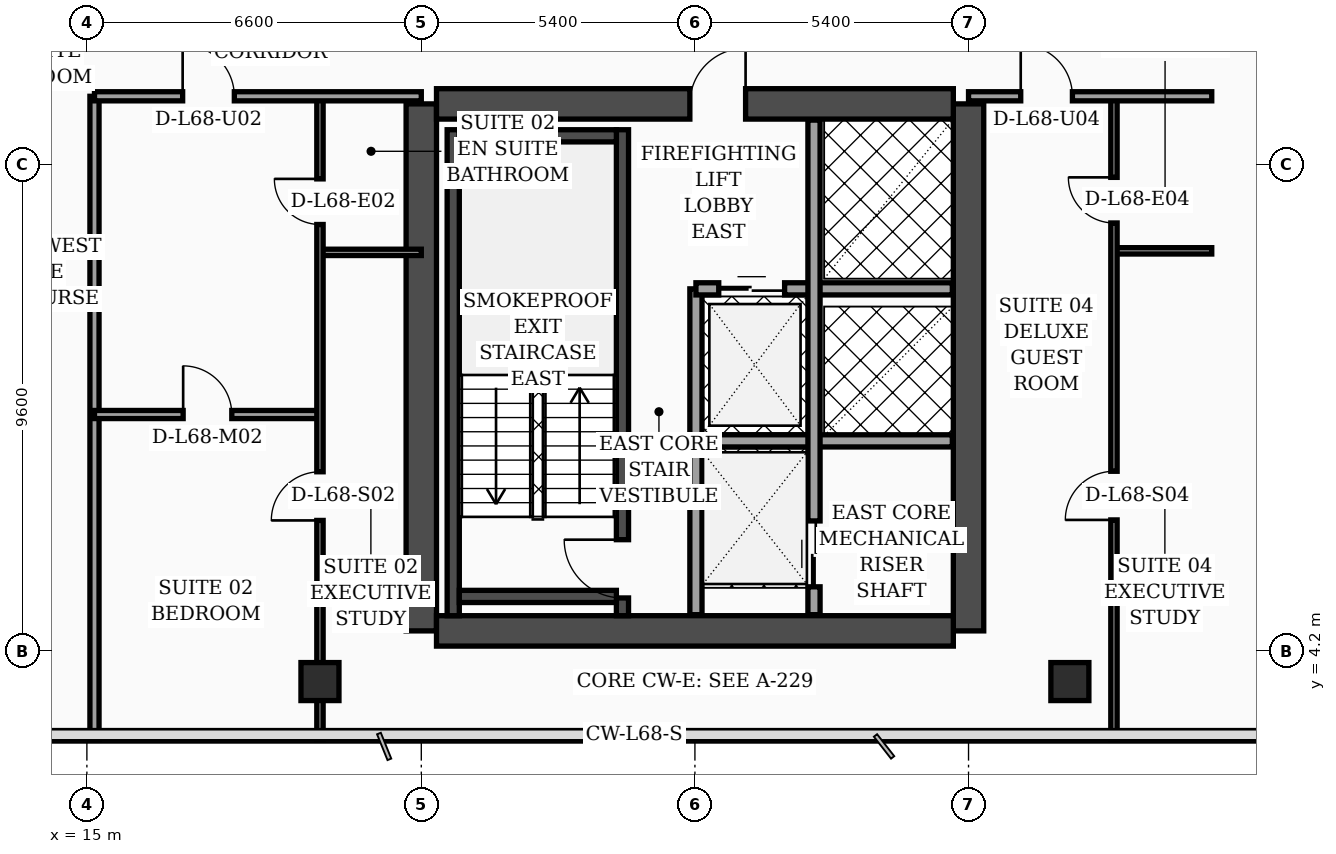
"""IFC4 building model, lengths in metres.
Left out: names, types, materials, properties, quantities, classifications, styles, units other than length and angle.
Written with IfcOpenShell. Run it as: python <this file> out.ifc"""

import sys

from ifc_helpers import new_model, si_unit, direction, frame, frame_2d, origin, origin_2d, place, context, subcontext, project, spatial, rectangle, hollow_rectangle, extrude, element, fill, save


model = new_model("IFC4")
c1 = context("Model", 3, precision=1e-05, world=origin(), true_north=direction((0.0, 1.0)))
c2 = subcontext(c1, "Body", "Model", "MODEL_VIEW")
j1 = project(units=[si_unit("LENGTHUNIT", "METRE"), si_unit("PLANEANGLEUNIT", "RADIAN")], contexts=[c1])
p1 = place(None, origin())
s1 = spatial("IfcSite", under=j1, at=p1, CompositionType="ELEMENT")
p2 = place(p1, origin())
s2 = spatial("IfcBuilding", under=s1, at=p2, CompositionType="ELEMENT")
p3 = place(p2, frame((0.0, 0.0, 274.9)))
s3 = spatial("IfcBuildingStorey", under=s2, at=p3, CompositionType="ELEMENT", Elevation=274.9)
for number, where, z_axis, x_axis in (
    (1, (21.6, 4.6, 0.0), (0.0, 0.0, 1.0), (0.0, 1.0, 0.0)),
    (2, (32.4, 4.6, 0.0), (0.0, 0.0, 1.0), (0.0, 1.0, 0.0)),
):
    element("IfcWall", number, at=place(p3, frame(where, z_axis=z_axis, x_axis=x_axis)), inside=s3, PredefinedType="SHEAR", context=c2, shape_type="SweptSolid", body=[
        extrude(rectangle(XDim=10.4, YDim=0.6, at=frame_2d((5.2, 0.0))), origin(), (0.0, 0.0, 1.0), 3.56),
    ])
p4 = place(p3, frame((21.9, 15.0, 0.0), z_axis=(0.0, 0.0, 1.0), x_axis=(1.0, 0.0, 0.0)))
e3 = element("IfcWall", 3, at=p4, inside=s3, PredefinedType="SHEAR", context=c2, shape_type="SweptSolid", body=[
    extrude(rectangle(XDim=10.2, YDim=0.6, at=frame_2d((5.1, 0.0))), origin(), (0.0, 0.0, 1.0), 3.56),
])
p5 = place(p4, frame((5.0, 0.0, 0.0)))
e4 = element("IfcOpeningElement", 4, at=p5, cuts=e3, PredefinedType="OPENING", context=c2, shape_type="SweptSolid", body=[
    extrude(rectangle(XDim=1.1, YDim=2.2, at=frame_2d((0.55, 1.1))), frame((0.0, 0.31, 0.0), z_axis=(0.0, -1.0, 0.0), x_axis=(1.0, 0.0, 0.0)), (0.0, 0.0, 1.0), 0.62),
])
p6 = place(p3, frame((21.9, 4.6, 0.0), z_axis=(0.0, 0.0, 1.0), x_axis=(1.0, 0.0, 0.0)))
e5 = element("IfcWall", 5, at=p6, inside=s3, PredefinedType="SHEAR", context=c2, shape_type="SweptSolid", body=[
    extrude(rectangle(XDim=10.2, YDim=0.6, at=frame_2d((5.1, 0.0))), origin(), (0.0, 0.0, 1.0), 3.56),
])
p7 = place(p3, frame((22.23, 4.9, 0.0), z_axis=(0.0, 0.0, 1.0), x_axis=(0.0, 1.0, 0.0)))
e6 = element("IfcWall", 6, at=p7, inside=s3, PredefinedType="SOLIDWALL", context=c2, shape_type="SweptSolid", body=[
    extrude(rectangle(XDim=9.59, YDim=0.24, at=frame_2d((4.795, 0.0))), origin(), (0.0, 0.0, 1.0), 3.56),
])
p8 = place(p3, frame((25.57, 4.9, 0.0), z_axis=(0.0, 0.0, 1.0), x_axis=(0.0, 1.0, 0.0)))
e7 = element("IfcWall", 7, at=p8, inside=s3, PredefinedType="SOLIDWALL", context=c2, shape_type="SweptSolid", body=[
    extrude(rectangle(XDim=9.59, YDim=0.24, at=frame_2d((4.795, 0.0))), origin(), (0.0, 0.0, 1.0), 3.56),
])
p9 = place(p8, frame((0.35, 0.0, 0.0)))
e8 = element("IfcOpeningElement", 8, at=p9, cuts=e7, PredefinedType="OPENING", context=c2, shape_type="SweptSolid", body=[
    extrude(rectangle(XDim=1.15, YDim=2.2, at=frame_2d((0.575, 1.1))), frame((0.0, 0.13, 0.0), z_axis=(0.0, -1.0, 0.0), x_axis=(1.0, 0.0, 0.0)), (0.0, 0.0, 1.0), 0.26),
])
for number, where, z_axis, x_axis in (
    (9, (22.35, 5.28, 0.0), (0.0, 0.0, 1.0), (1.0, 0.0, 0.0)),
    (10, (22.35, 14.37, 0.0), (0.0, 0.0, 1.0), (1.0, 0.0, 0.0)),
):
    element("IfcWall", number, at=place(p3, frame(where, z_axis=z_axis, x_axis=x_axis)), inside=s3, PredefinedType="SOLIDWALL", context=c2, shape_type="SweptSolid", body=[
        extrude(rectangle(XDim=3.1, YDim=0.24, at=frame_2d((1.55, 0.0))), origin(), (0.0, 0.0, 1.0), 3.56),
    ])
for number, where, z_axis, x_axis in (
    (11, (19.6, 3.6, 0.0), (0.0, 0.0, 1.0), (1.0, 0.0, 0.0)),
    (12, (34.4, 3.6, 0.0), (0.0, 0.0, 1.0), (1.0, 0.0, 0.0)),
):
    element("IfcColumn", number, at=place(p3, frame(where, z_axis=z_axis, x_axis=x_axis)), inside=s3, PredefinedType="COLUMN", context=c2, shape_type="SweptSolid", body=[
        extrude(hollow_rectangle(XDim=0.75, YDim=0.75, WallThickness=0.032, at=origin_2d()), origin(), (0.0, 0.0, 1.0), 3.56),
    ])
p10 = place(p3, frame((43.83, 5.505, 0.0), z_axis=(0.0, 0.0, 1.0), x_axis=(-0.300509063924, 0.953778958931, 0.0)))
e13 = element("IfcWall", 13, at=p10, inside=s3, PredefinedType="SOLIDWALL", context=c2, shape_type="SweptSolid", body=[
    extrude(rectangle(XDim=30.814, YDim=0.32, at=frame_2d((15.407, 0.0))), origin(), (0.0, 0.0, 1.0), 3.56),
])
p11 = place(p10, frame((10.199, 0.0, 0.0)))
e14 = element("IfcOpeningElement", 14, at=p11, cuts=e13, PredefinedType="OPENING", context=c2, shape_type="SweptSolid", body=[
    extrude(rectangle(XDim=1.4, YDim=2.25, at=frame_2d((0.7, 1.125))), frame((0.0, 0.17, 0.0), z_axis=(0.0, -1.0, 0.0), x_axis=(1.0, 0.0, 0.0)), (0.0, 0.0, 1.0), 0.34),
])
p12 = place(p10, frame((4.437, 0.0, 0.7)))
e15 = element("IfcOpeningElement", 15, at=p12, cuts=e13, PredefinedType="OPENING", context=c2, shape_type="SweptSolid", body=[
    extrude(rectangle(XDim=1.6, YDim=1.65, at=frame_2d((0.8, 0.825))), frame((0.0, 0.17, 0.0), z_axis=(0.0, -1.0, 0.0), x_axis=(1.0, 0.0, 0.0)), (0.0, 0.0, 1.0), 0.34),
])
p13 = place(p10, frame((18.696, 0.0, 0.7)))
e16 = element("IfcOpeningElement", 16, at=p13, cuts=e13, PredefinedType="OPENING", context=c2, shape_type="SweptSolid", body=[
    extrude(rectangle(XDim=1.6, YDim=1.65, at=frame_2d((0.8, 0.825))), frame((0.0, 0.17, 0.0), z_axis=(0.0, -1.0, 0.0), x_axis=(1.0, 0.0, 0.0)), (0.0, 0.0, 1.0), 0.34),
])
p14 = place(p10, frame((1.6, 0.0, 0.75)))
e17 = element("IfcOpeningElement", 17, at=p14, cuts=e13, PredefinedType="OPENING", context=c2, shape_type="SweptSolid", body=[
    extrude(rectangle(XDim=1.5, YDim=1.6, at=frame_2d((0.75, 0.8))), frame((0.0, 0.17, 0.0), z_axis=(0.0, -1.0, 0.0), x_axis=(1.0, 0.0, 0.0)), (0.0, 0.0, 1.0), 0.34),
])
p15 = place(p10, frame((7.8, 0.0, 0.75)))
e18 = element("IfcOpeningElement", 18, at=p15, cuts=e13, PredefinedType="OPENING", context=c2, shape_type="SweptSolid", body=[
    extrude(rectangle(XDim=1.5, YDim=1.6, at=frame_2d((0.75, 0.8))), frame((0.0, 0.17, 0.0), z_axis=(0.0, -1.0, 0.0), x_axis=(1.0, 0.0, 0.0)), (0.0, 0.0, 1.0), 0.34),
])
p16 = place(p10, frame((14.0, 0.0, 0.75)))
e19 = element("IfcOpeningElement", 19, at=p16, cuts=e13, PredefinedType="OPENING", context=c2, shape_type="SweptSolid", body=[
    extrude(rectangle(XDim=1.5, YDim=1.6, at=frame_2d((0.75, 0.8))), frame((0.0, 0.17, 0.0), z_axis=(0.0, -1.0, 0.0), x_axis=(1.0, 0.0, 0.0)), (0.0, 0.0, 1.0), 0.34),
])
p17 = place(p10, frame((16.55, 0.0, 0.75)))
e20 = element("IfcOpeningElement", 20, at=p17, cuts=e13, PredefinedType="OPENING", context=c2, shape_type="SweptSolid", body=[
    extrude(rectangle(XDim=1.5, YDim=1.6, at=frame_2d((0.75, 0.8))), frame((0.0, 0.17, 0.0), z_axis=(0.0, -1.0, 0.0), x_axis=(1.0, 0.0, 0.0)), (0.0, 0.0, 1.0), 0.34),
])
p18 = place(p10, frame((20.75, 0.0, 0.75)))
e21 = element("IfcOpeningElement", 21, at=p18, cuts=e13, PredefinedType="OPENING", context=c2, shape_type="SweptSolid", body=[
    extrude(rectangle(XDim=1.5, YDim=1.6, at=frame_2d((0.75, 0.8))), frame((0.0, 0.17, 0.0), z_axis=(0.0, -1.0, 0.0), x_axis=(1.0, 0.0, 0.0)), (0.0, 0.0, 1.0), 0.34),
])
p19 = place(p10, frame((23.3, 0.0, 0.75)))
e22 = element("IfcOpeningElement", 22, at=p19, cuts=e13, PredefinedType="OPENING", context=c2, shape_type="SweptSolid", body=[
    extrude(rectangle(XDim=1.5, YDim=1.6, at=frame_2d((0.75, 0.8))), frame((0.0, 0.17, 0.0), z_axis=(0.0, -1.0, 0.0), x_axis=(1.0, 0.0, 0.0)), (0.0, 0.0, 1.0), 0.34),
])
p20 = place(p10, frame((26.4, 0.0, 0.75)))
e23 = element("IfcOpeningElement", 23, at=p20, cuts=e13, PredefinedType="OPENING", context=c2, shape_type="SweptSolid", body=[
    extrude(rectangle(XDim=1.5, YDim=1.6, at=frame_2d((0.75, 0.8))), frame((0.0, 0.17, 0.0), z_axis=(0.0, -1.0, 0.0), x_axis=(1.0, 0.0, 0.0)), (0.0, 0.0, 1.0), 0.34),
])
p21 = place(p3, frame((27.02, 4.92, 0.0), z_axis=(0.0, 0.0, 1.0), x_axis=(0.0, 1.0, 0.0)))
e24 = element("IfcWall", 24, at=p21, inside=s3, PredefinedType="SOLIDWALL", context=c2, shape_type="SweptSolid", body=[
    extrude(rectangle(XDim=6.43, YDim=0.24, at=frame_2d((3.215, 0.0))), origin(), (0.0, 0.0, 1.0), 3.56),
])
p22 = place(p3, frame((27.02, 11.35, 0.0), z_axis=(0.0, 0.0, 1.0), x_axis=(1.0, 0.0, 0.0)))
e25 = element("IfcWall", 25, at=p22, inside=s3, PredefinedType="SOLIDWALL", context=c2, shape_type="SweptSolid", body=[
    extrude(rectangle(XDim=5.06, YDim=0.24, at=frame_2d((2.53, 0.0))), origin(), (0.0, 0.0, 1.0), 3.56),
])
p23 = place(p22, frame((0.45, 0.0, 0.0)))
e26 = element("IfcOpeningElement", 26, at=p23, cuts=e25, PredefinedType="OPENING", context=c2, shape_type="SweptSolid", body=[
    extrude(rectangle(XDim=1.3, YDim=2.35, at=frame_2d((0.65, 1.175))), frame((0.0, 0.13, 0.0), z_axis=(0.0, -1.0, 0.0), x_axis=(1.0, 0.0, 0.0)), (0.0, 0.0, 1.0), 0.26),
])
p24 = place(p3, frame((27.02, 8.35, 0.0), z_axis=(0.0, 0.0, 1.0), x_axis=(1.0, 0.0, 0.0)))
e27 = element("IfcWall", 27, at=p24, inside=s3, PredefinedType="SOLIDWALL", context=c2, shape_type="SweptSolid", body=[
    extrude(rectangle(XDim=5.06, YDim=0.24, at=frame_2d((2.53, 0.0))), origin(), (0.0, 0.0, 1.0), 3.56),
])
p25 = place(p3, frame((29.35, 4.92, 0.0), z_axis=(0.0, 0.0, 1.0), x_axis=(0.0, 1.0, 0.0)))
e28 = element("IfcWall", 28, at=p25, inside=s3, PredefinedType="SOLIDWALL", context=c2, shape_type="SweptSolid", body=[
    extrude(rectangle(XDim=9.76, YDim=0.24, at=frame_2d((4.88, 0.0))), origin(), (0.0, 0.0, 1.0), 3.56),
])
p26 = place(p25, frame((0.55, 0.0, 0.0)))
e29 = element("IfcOpeningElement", 29, at=p26, cuts=e28, PredefinedType="OPENING", context=c2, shape_type="SweptSolid", body=[
    extrude(rectangle(XDim=1.3, YDim=2.35, at=frame_2d((0.65, 1.175))), frame((0.0, 0.13, 0.0), z_axis=(0.0, -1.0, 0.0), x_axis=(1.0, 0.0, 0.0)), (0.0, 0.0, 1.0), 0.26),
])
p27 = place(p3, frame((15.15, 2.44, 0.0), z_axis=(0.0, 0.0, 1.0), x_axis=(0.0, 1.0, 0.0)))
e30 = element("IfcWall", 30, at=p27, inside=s3, PredefinedType="PARTITIONING", context=c2, shape_type="SweptSolid", body=[
    extrude(rectangle(XDim=12.71, YDim=0.18, at=frame_2d((6.355, 0.0))), origin(), (0.0, 0.0, 1.0), 3.09),
])
p28 = place(p3, frame((19.6, 12.07, 0.0), z_axis=(0.0, 0.0, 1.0), x_axis=(1.0, 0.0, 0.0)))
e31 = element("IfcWall", 31, at=p28, inside=s3, PredefinedType="PARTITIONING", context=c2, shape_type="SweptSolid", body=[
    extrude(rectangle(XDim=2.0, YDim=0.125, at=frame_2d((1.0, 0.0))), origin(), (0.0, 0.0, 1.0), 3.56),
])
p29 = place(p3, frame((15.15, 8.87, 0.0), z_axis=(0.0, 0.0, 1.0), x_axis=(1.0, 0.0, 0.0)))
e32 = element("IfcWall", 32, at=p29, inside=s3, PredefinedType="PARTITIONING", context=c2, shape_type="SweptSolid", body=[
    extrude(rectangle(XDim=4.45, YDim=0.16, at=frame_2d((2.225, 0.0))), origin(), (0.0, 0.0, 1.0), 3.56),
])
p30 = place(p29, frame((1.75, 0.0, 0.0)))
e33 = element("IfcOpeningElement", 33, at=p30, cuts=e32, PredefinedType="OPENING", context=c2, shape_type="SweptSolid", body=[
    extrude(rectangle(XDim=0.96, YDim=2.2, at=frame_2d((0.48, 1.1))), frame((0.0, 0.09, 0.0), z_axis=(0.0, -1.0, 0.0), x_axis=(1.0, 0.0, 0.0)), (0.0, 0.0, 1.0), 0.18),
])
p31 = place(p3, frame((19.6, 2.44, 0.0), z_axis=(0.0, 0.0, 1.0), x_axis=(0.0, 1.0, 0.0)))
e34 = element("IfcWall", 34, at=p31, inside=s3, PredefinedType="PARTITIONING", context=c2, shape_type="SweptSolid", body=[
    extrude(rectangle(XDim=12.71, YDim=0.125, at=frame_2d((6.355, 0.0))), origin(), (0.0, 0.0, 1.0), 2.59),
])
p32 = place(p31, frame((4.34, 0.0, 0.0)))
e35 = element("IfcOpeningElement", 35, at=p32, cuts=e34, PredefinedType="OPENING", context=c2, shape_type="SweptSolid", body=[
    extrude(rectangle(XDim=0.96, YDim=2.2, at=frame_2d((0.48, 1.1))), frame((0.0, 0.073, 0.0), z_axis=(0.0, -1.0, 0.0), x_axis=(1.0, 0.0, 0.0)), (0.0, 0.0, 1.0), 0.145),
])
p33 = place(p31, frame((10.18, 0.0, 0.0)))
e36 = element("IfcOpeningElement", 36, at=p33, cuts=e34, PredefinedType="OPENING", context=c2, shape_type="SweptSolid", body=[
    extrude(rectangle(XDim=0.9, YDim=2.15, at=frame_2d((0.45, 1.075))), frame((0.0, 0.073, 0.0), z_axis=(0.0, -1.0, 0.0), x_axis=(1.0, 0.0, 0.0)), (0.0, 0.0, 1.0), 0.145),
])
p34 = place(p3, frame((15.15, 15.15, 0.0), z_axis=(0.0, 0.0, 1.0), x_axis=(1.0, 0.0, 0.0)))
e37 = element("IfcWall", 37, at=p34, inside=s3, PredefinedType="PARTITIONING", context=c2, shape_type="SweptSolid", body=[
    extrude(rectangle(XDim=6.45, YDim=0.18, at=frame_2d((3.225, 0.0))), origin(), (0.0, 0.0, 1.0), 2.59),
])
p35 = place(p34, frame((1.74, 0.0, 0.0)))
e38 = element("IfcOpeningElement", 38, at=p35, cuts=e37, PredefinedType="OPENING", context=c2, shape_type="SweptSolid", body=[
    extrude(rectangle(XDim=1.02, YDim=2.2, at=frame_2d((0.51, 1.1))), frame((0.0, 0.1, 0.0), z_axis=(0.0, -1.0, 0.0), x_axis=(1.0, 0.0, 0.0)), (0.0, 0.0, 1.0), 0.2),
])
p36 = place(p3, frame((35.27, 12.1, 0.0), z_axis=(0.0, 0.0, 1.0), x_axis=(1.0, 0.0, 0.0)))
e39 = element("IfcWall", 39, at=p36, inside=s3, PredefinedType="PARTITIONING", context=c2, shape_type="SweptSolid", body=[
    extrude(rectangle(XDim=1.93, YDim=0.125, at=frame_2d((0.965, 0.0))), origin(), (0.0, 0.0, 1.0), 3.56),
])
p37 = place(p3, frame((35.27, 2.44, 0.0), z_axis=(0.0, 0.0, 1.0), x_axis=(0.0, 1.0, 0.0)))
e40 = element("IfcWall", 40, at=p37, inside=s3, PredefinedType="PARTITIONING", context=c2, shape_type="SweptSolid", body=[
    extrude(rectangle(XDim=12.71, YDim=0.125, at=frame_2d((6.355, 0.0))), origin(), (0.0, 0.0, 1.0), 2.99),
])
p38 = place(p37, frame((4.35, 0.0, 0.0)))
e41 = element("IfcOpeningElement", 41, at=p38, cuts=e40, PredefinedType="OPENING", context=c2, shape_type="SweptSolid", body=[
    extrude(rectangle(XDim=0.96, YDim=2.2, at=frame_2d((0.48, 1.1))), frame((0.0, 0.073, 0.0), z_axis=(0.0, -1.0, 0.0), x_axis=(1.0, 0.0, 0.0)), (0.0, 0.0, 1.0), 0.145),
])
p39 = place(p37, frame((10.21, 0.0, 0.0)))
e42 = element("IfcOpeningElement", 42, at=p39, cuts=e40, PredefinedType="OPENING", context=c2, shape_type="SweptSolid", body=[
    extrude(rectangle(XDim=0.9, YDim=2.15, at=frame_2d((0.45, 1.075))), frame((0.0, 0.073, 0.0), z_axis=(0.0, -1.0, 0.0), x_axis=(1.0, 0.0, 0.0)), (0.0, 0.0, 1.0), 0.145),
])
p40 = place(p3, frame((32.4, 15.15, 0.0), z_axis=(0.0, 0.0, 1.0), x_axis=(1.0, 0.0, 0.0)))
e43 = element("IfcWall", 43, at=p40, inside=s3, PredefinedType="PARTITIONING", context=c2, shape_type="SweptSolid", body=[
    extrude(rectangle(XDim=4.8, YDim=0.18, at=frame_2d((2.4, 0.0))), origin(), (0.0, 0.0, 1.0), 2.99),
])
p41 = place(p40, frame((1.03, 0.0, 0.0)))
e44 = element("IfcOpeningElement", 44, at=p41, cuts=e43, PredefinedType="OPENING", context=c2, shape_type="SweptSolid", body=[
    extrude(rectangle(XDim=1.02, YDim=2.2, at=frame_2d((0.51, 1.1))), frame((0.0, 0.1, 0.0), z_axis=(0.0, -1.0, 0.0), x_axis=(1.0, 0.0, 0.0)), (0.0, 0.0, 1.0), 0.2),
])
p42 = place(p23, origin())
e45 = element("IfcDoor", 45, at=p42, inside=s3, OperationType="DOUBLE_DOOR_SLIDING", PredefinedType="DOOR", context=c2, shape_type="SweptSolid", body=[
    extrude(rectangle(XDim=1.3, YDim=2.35, at=frame_2d((0.65, 1.175))), frame((0.0, 0.025, 0.0), z_axis=(0.0, -1.0, 0.0), x_axis=(1.0, 0.0, 0.0)), (0.0, 0.0, 1.0), 0.05),
])
fill(e26, e45)
p43 = place(p26, origin())
e46 = element("IfcDoor", 46, at=p43, inside=s3, OperationType="DOUBLE_DOOR_SLIDING", PredefinedType="DOOR", context=c2, shape_type="SweptSolid", body=[
    extrude(rectangle(XDim=1.3, YDim=2.35, at=frame_2d((0.65, 1.175))), frame((0.0, 0.025, 0.0), z_axis=(0.0, -1.0, 0.0), x_axis=(1.0, 0.0, 0.0)), (0.0, 0.0, 1.0), 0.05),
])
fill(e29, e46)
p44 = place(p30, origin())
e47 = element("IfcDoor", 47, at=p44, inside=s3, OperationType="SINGLE_SWING_LEFT", PredefinedType="DOOR", context=c2, shape_type="SweptSolid", body=[
    extrude(rectangle(XDim=0.96, YDim=2.2, at=frame_2d((0.48, 1.1))), frame((0.0, 0.025, 0.0), z_axis=(0.0, -1.0, 0.0), x_axis=(1.0, 0.0, 0.0)), (0.0, 0.0, 1.0), 0.05),
])
fill(e33, e47)
p45 = place(p32, origin())
e48 = element("IfcDoor", 48, at=p45, inside=s3, OperationType="SINGLE_SWING_LEFT", PredefinedType="DOOR", context=c2, shape_type="SweptSolid", body=[
    extrude(rectangle(XDim=0.96, YDim=2.2, at=frame_2d((0.48, 1.1))), frame((0.0, 0.025, 0.0), z_axis=(0.0, -1.0, 0.0), x_axis=(1.0, 0.0, 0.0)), (0.0, 0.0, 1.0), 0.05),
])
fill(e35, e48)
p46 = place(p33, origin())
e49 = element("IfcDoor", 49, at=p46, inside=s3, OperationType="SINGLE_SWING_RIGHT", PredefinedType="DOOR", context=c2, shape_type="SweptSolid", body=[
    extrude(rectangle(XDim=0.9, YDim=2.15, at=frame_2d((0.45, 1.075))), frame((0.0, 0.025, 0.0), z_axis=(0.0, -1.0, 0.0), x_axis=(1.0, 0.0, 0.0)), (0.0, 0.0, 1.0), 0.05),
])
fill(e36, e49)
p47 = place(p35, origin())
e50 = element("IfcDoor", 50, at=p47, inside=s3, OperationType="SINGLE_SWING_LEFT", PredefinedType="DOOR", context=c2, shape_type="SweptSolid", body=[
    extrude(rectangle(XDim=1.02, YDim=2.2, at=frame_2d((0.51, 1.1))), frame((0.0, 0.025, 0.0), z_axis=(0.0, -1.0, 0.0), x_axis=(1.0, 0.0, 0.0)), (0.0, 0.0, 1.0), 0.05),
])
fill(e38, e50)
p48 = place(p38, origin())
e51 = element("IfcDoor", 51, at=p48, inside=s3, OperationType="SINGLE_SWING_LEFT", PredefinedType="DOOR", context=c2, shape_type="SweptSolid", body=[
    extrude(rectangle(XDim=0.96, YDim=2.2, at=frame_2d((0.48, 1.1))), frame((0.0, 0.025, 0.0), z_axis=(0.0, -1.0, 0.0), x_axis=(1.0, 0.0, 0.0)), (0.0, 0.0, 1.0), 0.05),
])
fill(e41, e51)
p49 = place(p39, origin())
e52 = element("IfcDoor", 52, at=p49, inside=s3, OperationType="SINGLE_SWING_RIGHT", PredefinedType="DOOR", context=c2, shape_type="SweptSolid", body=[
    extrude(rectangle(XDim=0.9, YDim=2.15, at=frame_2d((0.45, 1.075))), frame((0.0, 0.025, 0.0), z_axis=(0.0, -1.0, 0.0), x_axis=(1.0, 0.0, 0.0)), (0.0, 0.0, 1.0), 0.05),
])
fill(e42, e52)
p50 = place(p41, origin())
e53 = element("IfcDoor", 53, at=p50, inside=s3, OperationType="SINGLE_SWING_LEFT", PredefinedType="DOOR", context=c2, shape_type="SweptSolid", body=[
    extrude(rectangle(XDim=1.02, YDim=2.2, at=frame_2d((0.51, 1.1))), frame((0.0, 0.025, 0.0), z_axis=(0.0, -1.0, 0.0), x_axis=(1.0, 0.0, 0.0)), (0.0, 0.0, 1.0), 0.05),
])
fill(e44, e53)
p51 = place(p9, origin())
e54 = element("IfcDoor", 54, at=p51, inside=s3, OperationType="SINGLE_SWING_RIGHT", PredefinedType="DOOR", context=c2, shape_type="SweptSolid", body=[
    extrude(rectangle(XDim=1.15, YDim=2.2, at=frame_2d((0.575, 1.1))), frame((0.0, 0.025, 0.0), z_axis=(0.0, -1.0, 0.0), x_axis=(1.0, 0.0, 0.0)), (0.0, 0.0, 1.0), 0.05),
])
fill(e8, e54)
p52 = place(p5, origin())
e55 = element("IfcDoor", 55, at=p52, inside=s3, OperationType="SINGLE_SWING_RIGHT", PredefinedType="DOOR", context=c2, shape_type="SweptSolid", body=[
    extrude(rectangle(XDim=1.1, YDim=2.2, at=frame_2d((0.55, 1.1))), frame((0.0, 0.025, 0.0), z_axis=(0.0, -1.0, 0.0), x_axis=(1.0, 0.0, 0.0)), (0.0, 0.0, 1.0), 0.05),
])
fill(e4, e55)
save(model, sys.argv[1])
